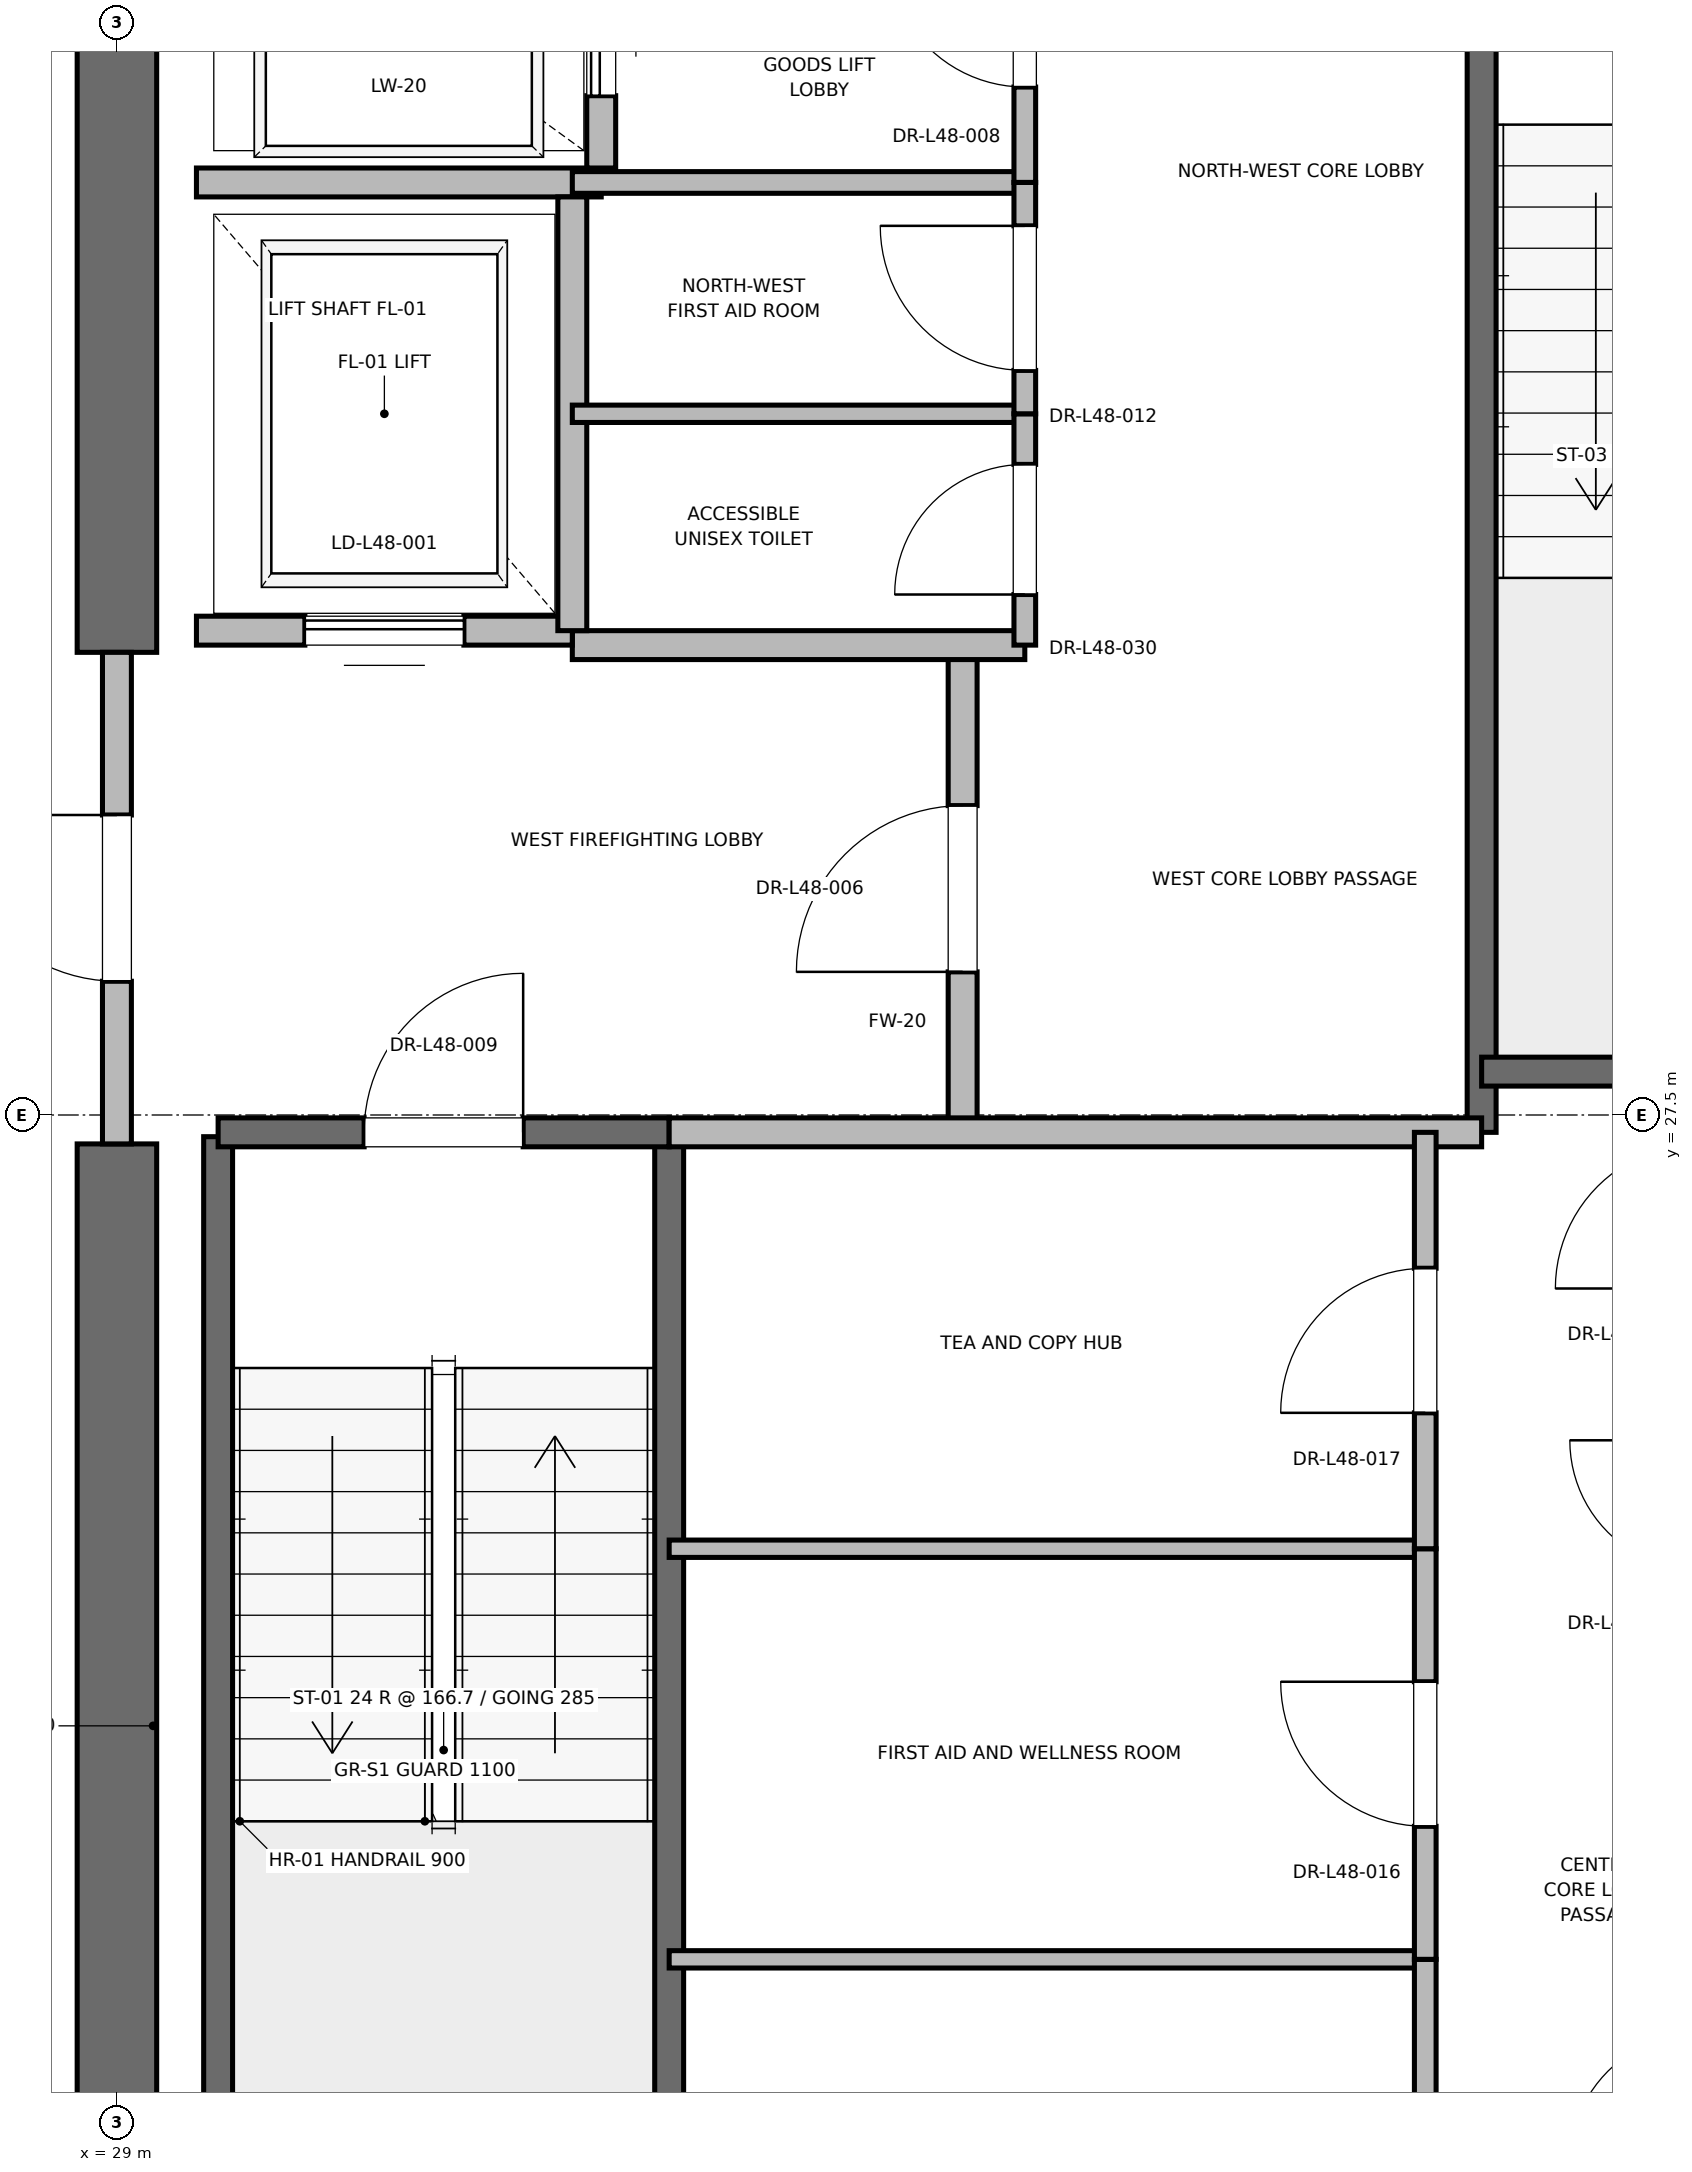
"""IFC4 building model, lengths in metres.
Left out: names, types, materials, properties, quantities, classifications, styles, units other than length and angle.
Written with IfcOpenShell. Run it as: python <this file> out.ifc"""

import sys

from ifc_helpers import new_model, si_unit, direction, frame, frame_2d, origin, place, context, subcontext, project, spatial, rectangle, extrude, element, fill, save


model = new_model("IFC4")
c1 = context("Model", 3, precision=1e-05, world=origin(), true_north=direction((0.0, 1.0)))
c2 = subcontext(c1, "Body", "Model", "MODEL_VIEW")
j1 = project(units=[si_unit("LENGTHUNIT", "METRE"), si_unit("PLANEANGLEUNIT", "RADIAN")], contexts=[c1])
p1 = place(None, origin())
s1 = spatial("IfcSite", under=j1, at=p1, CompositionType="ELEMENT")
p2 = place(p1, origin())
s2 = spatial("IfcBuilding", under=s1, at=p2, CompositionType="ELEMENT")
p3 = place(p2, frame((0.0, 0.0, 209.2)))
s3 = spatial("IfcBuildingStorey", under=s2, at=p3, CompositionType="ELEMENT", Elevation=209.2)
p4 = place(p3, frame((29.0, 18.5, 0.0), z_axis=(0.0, 0.0, 1.0), x_axis=(0.0, 1.0, 0.0)))
e1 = element("IfcWall", 1, at=p4, inside=s3, PredefinedType="SHEAR", context=c2, shape_type="SweptSolid", body=[
    extrude(rectangle(XDim=8.8, YDim=0.55, at=frame_2d((4.4, 0.0))), origin(), (0.0, 0.0, 1.0), 3.775),
])
p5 = place(p3, frame((29.0, 30.7, 0.0), z_axis=(0.0, 0.0, 1.0), x_axis=(0.0, 1.0, 0.0)))
e2 = element("IfcWall", 2, at=p5, inside=s3, PredefinedType="SHEAR", context=c2, shape_type="SweptSolid", body=[
    extrude(rectangle(XDim=5.8, YDim=0.55, at=frame_2d((2.9, 0.0))), origin(), (0.0, 0.0, 1.0), 3.775),
])
p6 = place(p3, frame((29.7, 19.2, 0.0), z_axis=(0.0, 0.0, 1.0), x_axis=(0.0, 1.0, 0.0)))
e3 = element("IfcWall", 3, at=p6, inside=s3, PredefinedType="SOLIDWALL", context=c2, shape_type="SweptSolid", body=[
    extrude(rectangle(XDim=8.15, YDim=0.2, at=frame_2d((4.075, 0.0))), origin(), (0.0, 0.0, 1.0), 3.775),
])
p7 = place(p3, frame((32.82, 18.6, 0.0), z_axis=(0.0, 0.0, 1.0), x_axis=(0.0, 1.0, 0.0)))
e4 = element("IfcWall", 4, at=p7, inside=s3, PredefinedType="SOLIDWALL", context=c2, shape_type="SweptSolid", body=[
    extrude(rectangle(XDim=8.78, YDim=0.2, at=frame_2d((4.39, 0.0))), origin(), (0.0, 0.0, 1.0), 3.775),
])
p8 = place(p3, frame((29.7, 27.38, 0.0), z_axis=(0.0, 0.0, 1.0), x_axis=(1.0, 0.0, 0.0)))
e5 = element("IfcWall", 5, at=p8, inside=s3, PredefinedType="SOLIDWALL", context=c2, shape_type="SweptSolid", body=[
    extrude(rectangle(XDim=3.12, YDim=0.2, at=frame_2d((1.56, 0.0))), origin(), (0.0, 0.0, 1.0), 3.775),
])
p9 = place(p8, frame((1.01, 0.0, 0.0)))
e6 = element("IfcOpeningElement", 6, at=p9, cuts=e5, PredefinedType="OPENING", context=c2, shape_type="SweptSolid", body=[
    extrude(rectangle(XDim=1.1, YDim=2.15, at=frame_2d((0.55, 1.075))), frame((0.0, 0.1, 0.0), z_axis=(0.0, -1.0, 0.0), x_axis=(1.0, 0.0, 0.0)), (0.0, 0.0, 1.0), 0.2),
])
p10 = place(p3, frame((38.44, 27.38, 0.0), z_axis=(0.0, 0.0, 1.0), x_axis=(0.0, 1.0, 0.0)))
e7 = element("IfcWall", 7, at=p10, inside=s3, PredefinedType="SOLIDWALL", context=c2, shape_type="SweptSolid", body=[
    extrude(rectangle(XDim=8.87, YDim=0.2, at=frame_2d((4.435, 0.0))), origin(), (0.0, 0.0, 1.0), 3.775),
])
p11 = place(p3, frame((38.44, 27.8, 0.0), z_axis=(0.0, 0.0, 1.0), x_axis=(1.0, 0.0, 0.0)))
e8 = element("IfcWall", 8, at=p11, inside=s3, PredefinedType="SOLIDWALL", context=c2, shape_type="SweptSolid", body=[
    extrude(rectangle(XDim=3.32, YDim=0.2, at=frame_2d((1.66, 0.0))), origin(), (0.0, 0.0, 1.0), 3.775),
])
p12 = place(p3, frame((34.85, 27.38, 0.0), z_axis=(0.0, 0.0, 1.0), x_axis=(0.0, 1.0, 0.0)))
e9 = element("IfcWall", 9, at=p12, inside=s3, PredefinedType="PARTITIONING", context=c2, shape_type="SweptSolid", body=[
    extrude(rectangle(XDim=3.37, YDim=0.2, at=frame_2d((1.685, 0.0))), origin(), (0.0, 0.0, 1.0), 3.775),
])
p13 = place(p12, frame((1.11, 0.0, 0.0)))
e10 = element("IfcOpeningElement", 10, at=p13, cuts=e9, PredefinedType="OPENING", context=c2, shape_type="SweptSolid", body=[
    extrude(rectangle(XDim=1.15, YDim=2.2, at=frame_2d((0.575, 1.1))), frame((0.0, 0.1, 0.0), z_axis=(0.0, -1.0, 0.0), x_axis=(1.0, 0.0, 0.0)), (0.0, 0.0, 1.0), 0.2),
])
p14 = place(p3, frame((29.0, 27.3, 0.0), z_axis=(0.0, 0.0, 1.0), x_axis=(0.0, 1.0, 0.0)))
e11 = element("IfcWall", 11, at=p14, inside=s3, PredefinedType="PARTITIONING", context=c2, shape_type="SweptSolid", body=[
    extrude(rectangle(XDim=3.4, YDim=0.2, at=frame_2d((1.7, 0.0))), origin(), (0.0, 0.0, 1.0), 2.755),
])
p15 = place(p14, frame((1.125, 0.0, 0.0)))
e12 = element("IfcOpeningElement", 12, at=p15, cuts=e11, PredefinedType="OPENING", context=c2, shape_type="SweptSolid", body=[
    extrude(rectangle(XDim=1.15, YDim=2.2, at=frame_2d((0.575, 1.1))), frame((0.0, 0.1, 0.0), z_axis=(0.0, -1.0, 0.0), x_axis=(1.0, 0.0, 0.0)), (0.0, 0.0, 1.0), 0.2),
])
p16 = place(p3, frame((32.82, 27.38, 0.0), z_axis=(0.0, 0.0, 1.0), x_axis=(1.0, 0.0, 0.0)))
e13 = element("IfcWall", 13, at=p16, inside=s3, PredefinedType="PARTITIONING", context=c2, shape_type="SweptSolid", body=[
    extrude(rectangle(XDim=5.62, YDim=0.2, at=frame_2d((2.81, 0.0))), origin(), (0.0, 0.0, 1.0), 3.775),
])
p17 = place(p3, frame((32.15, 30.75, 0.0), z_axis=(0.0, 0.0, 1.0), x_axis=(1.0, 0.0, 0.0)))
e14 = element("IfcWall", 14, at=p17, inside=s3, PredefinedType="PARTITIONING", context=c2, shape_type="SweptSolid", body=[
    extrude(rectangle(XDim=3.13, YDim=0.2, at=frame_2d((1.565, 0.0))), origin(), (0.0, 0.0, 1.0), 3.775),
])
p18 = place(p3, frame((29.55, 30.85, 0.0), z_axis=(0.0, 0.0, 1.0), x_axis=(1.0, 0.0, 0.0)))
e15 = element("IfcWall", 15, at=p18, inside=s3, PredefinedType="SOLIDWALL", context=c2, shape_type="SweptSolid", body=[
    extrude(rectangle(XDim=2.6, YDim=0.2, at=frame_2d((1.3, 0.0))), origin(), (0.0, 0.0, 1.0), 2.755),
])
p19 = place(p18, frame((0.75, 0.0, 0.0)))
e16 = element("IfcOpeningElement", 16, at=p19, cuts=e15, PredefinedType="OPENING", context=c2, shape_type="SweptSolid", body=[
    extrude(rectangle(XDim=1.1, YDim=2.2, at=frame_2d((0.55, 1.1))), frame((0.0, 0.1, 0.0), z_axis=(0.0, -1.0, 0.0), x_axis=(1.0, 0.0, 0.0)), (0.0, 0.0, 1.0), 0.2),
])
p20 = place(p3, frame((29.55, 33.95, 0.0), z_axis=(0.0, 0.0, 1.0), x_axis=(1.0, 0.0, 0.0)))
e17 = element("IfcWall", 17, at=p20, inside=s3, PredefinedType="SOLIDWALL", context=c2, shape_type="SweptSolid", body=[
    extrude(rectangle(XDim=2.8, YDim=0.2, at=frame_2d((1.4, 0.0))), origin(), (0.0, 0.0, 1.0), 3.775),
])
p21 = place(p3, frame((32.15, 30.85, 0.0), z_axis=(0.0, 0.0, 1.0), x_axis=(0.0, 1.0, 0.0)))
e18 = element("IfcWall", 18, at=p21, inside=s3, PredefinedType="SOLIDWALL", context=c2, shape_type="SweptSolid", body=[
    extrude(rectangle(XDim=3.0, YDim=0.2, at=frame_2d((1.5, 0.0))), origin(), (0.0, 0.0, 1.0), 3.775),
])
p22 = place(p3, frame((32.35, 34.05, 0.0), z_axis=(0.0, 0.0, 1.0), x_axis=(0.0, 1.0, 0.0)))
e19 = element("IfcWall", 19, at=p22, inside=s3, PredefinedType="SOLIDWALL", context=c2, shape_type="SweptSolid", body=[
    extrude(rectangle(XDim=2.1, YDim=0.2, at=frame_2d((1.05, 0.0))), origin(), (0.0, 0.0, 1.0), 3.775),
])
p23 = place(p22, frame((0.5, 0.0, 0.0)))
e20 = element("IfcOpeningElement", 20, at=p23, cuts=e19, PredefinedType="OPENING", context=c2, shape_type="SweptSolid", body=[
    extrude(rectangle(XDim=1.1, YDim=2.2, at=frame_2d((0.55, 1.1))), frame((0.0, 0.1, 0.0), z_axis=(0.0, -1.0, 0.0), x_axis=(1.0, 0.0, 0.0)), (0.0, 0.0, 1.0), 0.2),
])
p24 = place(p3, frame((32.15, 33.95, 0.0), z_axis=(0.0, 0.0, 1.0), x_axis=(1.0, 0.0, 0.0)))
e21 = element("IfcWall", 21, at=p24, inside=s3, PredefinedType="PARTITIONING", context=c2, shape_type="SweptSolid", body=[
    extrude(rectangle(XDim=3.13, YDim=0.15, at=frame_2d((1.565, 0.0))), origin(), (0.0, 0.0, 1.0), 2.85),
])
p25 = place(p3, frame((35.28, 33.95, 0.0), z_axis=(0.0, 0.0, 1.0), x_axis=(0.0, 1.0, 0.0)))
e22 = element("IfcWall", 22, at=p25, inside=s3, PredefinedType="PARTITIONING", context=c2, shape_type="SweptSolid", body=[
    extrude(rectangle(XDim=2.27, YDim=0.15, at=frame_2d((1.135, 0.0))), origin(), (0.0, 0.0, 1.0), 2.755),
])
p26 = place(p25, frame((0.66, 0.0, 0.0)))
e23 = element("IfcOpeningElement", 23, at=p26, cuts=e22, PredefinedType="OPENING", context=c2, shape_type="SweptSolid", body=[
    extrude(rectangle(XDim=0.95, YDim=2.15, at=frame_2d((0.475, 1.075))), frame((0.0, 0.075, 0.0), z_axis=(0.0, -1.0, 0.0), x_axis=(1.0, 0.0, 0.0)), (0.0, 0.0, 1.0), 0.15),
])
p27 = place(p3, frame((32.15, 32.35, 0.0), z_axis=(0.0, 0.0, 1.0), x_axis=(1.0, 0.0, 0.0)))
e24 = element("IfcWall", 24, at=p27, inside=s3, PredefinedType="PARTITIONING", context=c2, shape_type="SweptSolid", body=[
    extrude(rectangle(XDim=3.13, YDim=0.12, at=frame_2d((1.565, 0.0))), origin(), (0.0, 0.0, 1.0), 2.85),
])
p28 = place(p3, frame((35.28, 30.75, 0.0), z_axis=(0.0, 0.0, 1.0), x_axis=(0.0, 1.0, 0.0)))
e25 = element("IfcWall", 25, at=p28, inside=s3, PredefinedType="PARTITIONING", context=c2, shape_type="SweptSolid", body=[
    extrude(rectangle(XDim=1.6, YDim=0.15, at=frame_2d((0.8, 0.0))), origin(), (0.0, 0.0, 1.0), 2.85),
])
p29 = place(p28, frame((0.35, 0.0, 0.0)))
e26 = element("IfcOpeningElement", 26, at=p29, cuts=e25, PredefinedType="OPENING", context=c2, shape_type="SweptSolid", body=[
    extrude(rectangle(XDim=0.9, YDim=2.1, at=frame_2d((0.45, 1.05))), frame((0.0, 0.075, 0.0), z_axis=(0.0, -1.0, 0.0), x_axis=(1.0, 0.0, 0.0)), (0.0, 0.0, 1.0), 0.15),
])
p30 = place(p3, frame((35.28, 32.35, 0.0), z_axis=(0.0, 0.0, 1.0), x_axis=(0.0, 1.0, 0.0)))
e27 = element("IfcWall", 27, at=p30, inside=s3, PredefinedType="PARTITIONING", context=c2, shape_type="SweptSolid", body=[
    extrude(rectangle(XDim=1.6, YDim=0.15, at=frame_2d((0.8, 0.0))), origin(), (0.0, 0.0, 1.0), 2.85),
])
p31 = place(p30, frame((0.3, 0.0, 0.0)))
e28 = element("IfcOpeningElement", 28, at=p31, cuts=e27, PredefinedType="OPENING", context=c2, shape_type="SweptSolid", body=[
    extrude(rectangle(XDim=1.0, YDim=2.15, at=frame_2d((0.5, 1.075))), frame((0.0, 0.075, 0.0), z_axis=(0.0, -1.0, 0.0), x_axis=(1.0, 0.0, 0.0)), (0.0, 0.0, 1.0), 0.15),
])
for number, where, z_axis, x_axis in (
    (29, (32.82, 21.66, 0.0), (0.0, 0.0, 1.0), (1.0, 0.0, 0.0)),
    (30, (32.82, 24.5, 0.0), (0.0, 0.0, 1.0), (1.0, 0.0, 0.0)),
):
    element("IfcWall", number, at=place(p3, frame(where, z_axis=z_axis, x_axis=x_axis)), inside=s3, PredefinedType="PARTITIONING", context=c2, shape_type="SweptSolid", body=[
        extrude(rectangle(XDim=5.23, YDim=0.12, at=frame_2d((2.615, 0.0))), origin(), (0.0, 0.0, 1.0), 2.85),
    ])
p32 = place(p3, frame((38.05, 18.6, 0.0), z_axis=(0.0, 0.0, 1.0), x_axis=(0.0, 1.0, 0.0)))
e31 = element("IfcWall", 31, at=p32, inside=s3, PredefinedType="PARTITIONING", context=c2, shape_type="SweptSolid", body=[
    extrude(rectangle(XDim=3.06, YDim=0.15, at=frame_2d((1.53, 0.0))), origin(), (0.0, 0.0, 1.0), 2.755),
])
p33 = place(p32, frame((1.03, 0.0, 0.0)))
e32 = element("IfcOpeningElement", 32, at=p33, cuts=e31, PredefinedType="OPENING", context=c2, shape_type="SweptSolid", body=[
    extrude(rectangle(XDim=1.0, YDim=2.15, at=frame_2d((0.5, 1.075))), frame((0.0, 0.075, 0.0), z_axis=(0.0, -1.0, 0.0), x_axis=(1.0, 0.0, 0.0)), (0.0, 0.0, 1.0), 0.15),
])
p34 = place(p3, frame((38.05, 21.66, 0.0), z_axis=(0.0, 0.0, 1.0), x_axis=(0.0, 1.0, 0.0)))
e33 = element("IfcWall", 33, at=p34, inside=s3, PredefinedType="PARTITIONING", context=c2, shape_type="SweptSolid", body=[
    extrude(rectangle(XDim=2.84, YDim=0.15, at=frame_2d((1.42, 0.0))), origin(), (0.0, 0.0, 1.0), 2.85),
])
p35 = place(p34, frame((0.92, 0.0, 0.0)))
e34 = element("IfcOpeningElement", 34, at=p35, cuts=e33, PredefinedType="OPENING", context=c2, shape_type="SweptSolid", body=[
    extrude(rectangle(XDim=1.0, YDim=2.15, at=frame_2d((0.5, 1.075))), frame((0.0, 0.075, 0.0), z_axis=(0.0, -1.0, 0.0), x_axis=(1.0, 0.0, 0.0)), (0.0, 0.0, 1.0), 0.15),
])
p36 = place(p3, frame((38.05, 24.5, 0.0), z_axis=(0.0, 0.0, 1.0), x_axis=(0.0, 1.0, 0.0)))
e35 = element("IfcWall", 35, at=p36, inside=s3, PredefinedType="PARTITIONING", context=c2, shape_type="SweptSolid", body=[
    extrude(rectangle(XDim=2.88, YDim=0.15, at=frame_2d((1.44, 0.0))), origin(), (0.0, 0.0, 1.0), 2.85),
])
p37 = place(p36, frame((0.94, 0.0, 0.0)))
e36 = element("IfcOpeningElement", 36, at=p37, cuts=e35, PredefinedType="OPENING", context=c2, shape_type="SweptSolid", body=[
    extrude(rectangle(XDim=1.0, YDim=2.15, at=frame_2d((0.5, 1.075))), frame((0.0, 0.075, 0.0), z_axis=(0.0, -1.0, 0.0), x_axis=(1.0, 0.0, 0.0)), (0.0, 0.0, 1.0), 0.15),
])
p38 = place(p9, origin())
e37 = element("IfcDoor", 37, at=p38, inside=s3, OperationType="SINGLE_SWING_RIGHT", PredefinedType="DOOR", context=c2, shape_type="SweptSolid", body=[
    extrude(rectangle(XDim=1.1, YDim=2.15, at=frame_2d((0.55, 1.075))), frame((0.0, 0.025, 0.0), z_axis=(0.0, -1.0, 0.0), x_axis=(1.0, 0.0, 0.0)), (0.0, 0.0, 1.0), 0.05),
])
fill(e6, e37)
p39 = place(p13, origin())
e38 = element("IfcDoor", 38, at=p39, inside=s3, OperationType="SINGLE_SWING_LEFT", PredefinedType="DOOR", context=c2, shape_type="SweptSolid", body=[
    extrude(rectangle(XDim=1.15, YDim=2.2, at=frame_2d((0.575, 1.1))), frame((0.0, 0.025, 0.0), z_axis=(0.0, -1.0, 0.0), x_axis=(1.0, 0.0, 0.0)), (0.0, 0.0, 1.0), 0.05),
])
fill(e10, e38)
p40 = place(p15, origin())
e39 = element("IfcDoor", 39, at=p40, inside=s3, OperationType="SINGLE_SWING_RIGHT", PredefinedType="DOOR", context=c2, shape_type="SweptSolid", body=[
    extrude(rectangle(XDim=1.15, YDim=2.2, at=frame_2d((0.575, 1.1))), frame((0.0, 0.025, 0.0), z_axis=(0.0, -1.0, 0.0), x_axis=(1.0, 0.0, 0.0)), (0.0, 0.0, 1.0), 0.05),
])
fill(e12, e39)
p41 = place(p19, origin())
e40 = element("IfcDoor", 40, at=p41, inside=s3, OperationType="SLIDING_TO_RIGHT", PredefinedType="DOOR", context=c2, shape_type="SweptSolid", body=[
    extrude(rectangle(XDim=1.1, YDim=2.2, at=frame_2d((0.55, 1.1))), frame((0.0, 0.025, 0.0), z_axis=(0.0, -1.0, 0.0), x_axis=(1.0, 0.0, 0.0)), (0.0, 0.0, 1.0), 0.05),
])
fill(e16, e40)
p42 = place(p23, origin())
e41 = element("IfcDoor", 41, at=p42, inside=s3, OperationType="SLIDING_TO_RIGHT", PredefinedType="DOOR", context=c2, shape_type="SweptSolid", body=[
    extrude(rectangle(XDim=1.1, YDim=2.2, at=frame_2d((0.55, 1.1))), frame((0.0, 0.025, 0.0), z_axis=(0.0, -1.0, 0.0), x_axis=(1.0, 0.0, 0.0)), (0.0, 0.0, 1.0), 0.05),
])
fill(e20, e41)
p43 = place(p26, origin())
e42 = element("IfcDoor", 42, at=p43, inside=s3, OperationType="SINGLE_SWING_RIGHT", PredefinedType="DOOR", context=c2, shape_type="SweptSolid", body=[
    extrude(rectangle(XDim=0.95, YDim=2.15, at=frame_2d((0.475, 1.075))), frame((0.0, 0.025, 0.0), z_axis=(0.0, -1.0, 0.0), x_axis=(1.0, 0.0, 0.0)), (0.0, 0.0, 1.0), 0.05),
])
fill(e23, e42)
p44 = place(p29, origin())
e43 = element("IfcDoor", 43, at=p44, inside=s3, OperationType="SINGLE_SWING_LEFT", PredefinedType="DOOR", context=c2, shape_type="SweptSolid", body=[
    extrude(rectangle(XDim=0.9, YDim=2.1, at=frame_2d((0.45, 1.05))), frame((0.0, 0.025, 0.0), z_axis=(0.0, -1.0, 0.0), x_axis=(1.0, 0.0, 0.0)), (0.0, 0.0, 1.0), 0.05),
])
fill(e26, e43)
p45 = place(p31, origin())
e44 = element("IfcDoor", 44, at=p45, inside=s3, OperationType="SINGLE_SWING_RIGHT", PredefinedType="DOOR", context=c2, shape_type="SweptSolid", body=[
    extrude(rectangle(XDim=1.0, YDim=2.15, at=frame_2d((0.5, 1.075))), frame((0.0, 0.025, 0.0), z_axis=(0.0, -1.0, 0.0), x_axis=(1.0, 0.0, 0.0)), (0.0, 0.0, 1.0), 0.05),
])
fill(e28, e44)
p46 = place(p35, origin())
e45 = element("IfcDoor", 45, at=p46, inside=s3, OperationType="SINGLE_SWING_RIGHT", PredefinedType="DOOR", context=c2, shape_type="SweptSolid", body=[
    extrude(rectangle(XDim=1.0, YDim=2.15, at=frame_2d((0.5, 1.075))), frame((0.0, 0.025, 0.0), z_axis=(0.0, -1.0, 0.0), x_axis=(1.0, 0.0, 0.0)), (0.0, 0.0, 1.0), 0.05),
])
fill(e34, e45)
p47 = place(p37, origin())
e46 = element("IfcDoor", 46, at=p47, inside=s3, OperationType="SINGLE_SWING_LEFT", PredefinedType="DOOR", context=c2, shape_type="SweptSolid", body=[
    extrude(rectangle(XDim=1.0, YDim=2.15, at=frame_2d((0.5, 1.075))), frame((0.0, 0.025, 0.0), z_axis=(0.0, -1.0, 0.0), x_axis=(1.0, 0.0, 0.0)), (0.0, 0.0, 1.0), 0.05),
])
fill(e36, e46)
save(model, sys.argv[1])
